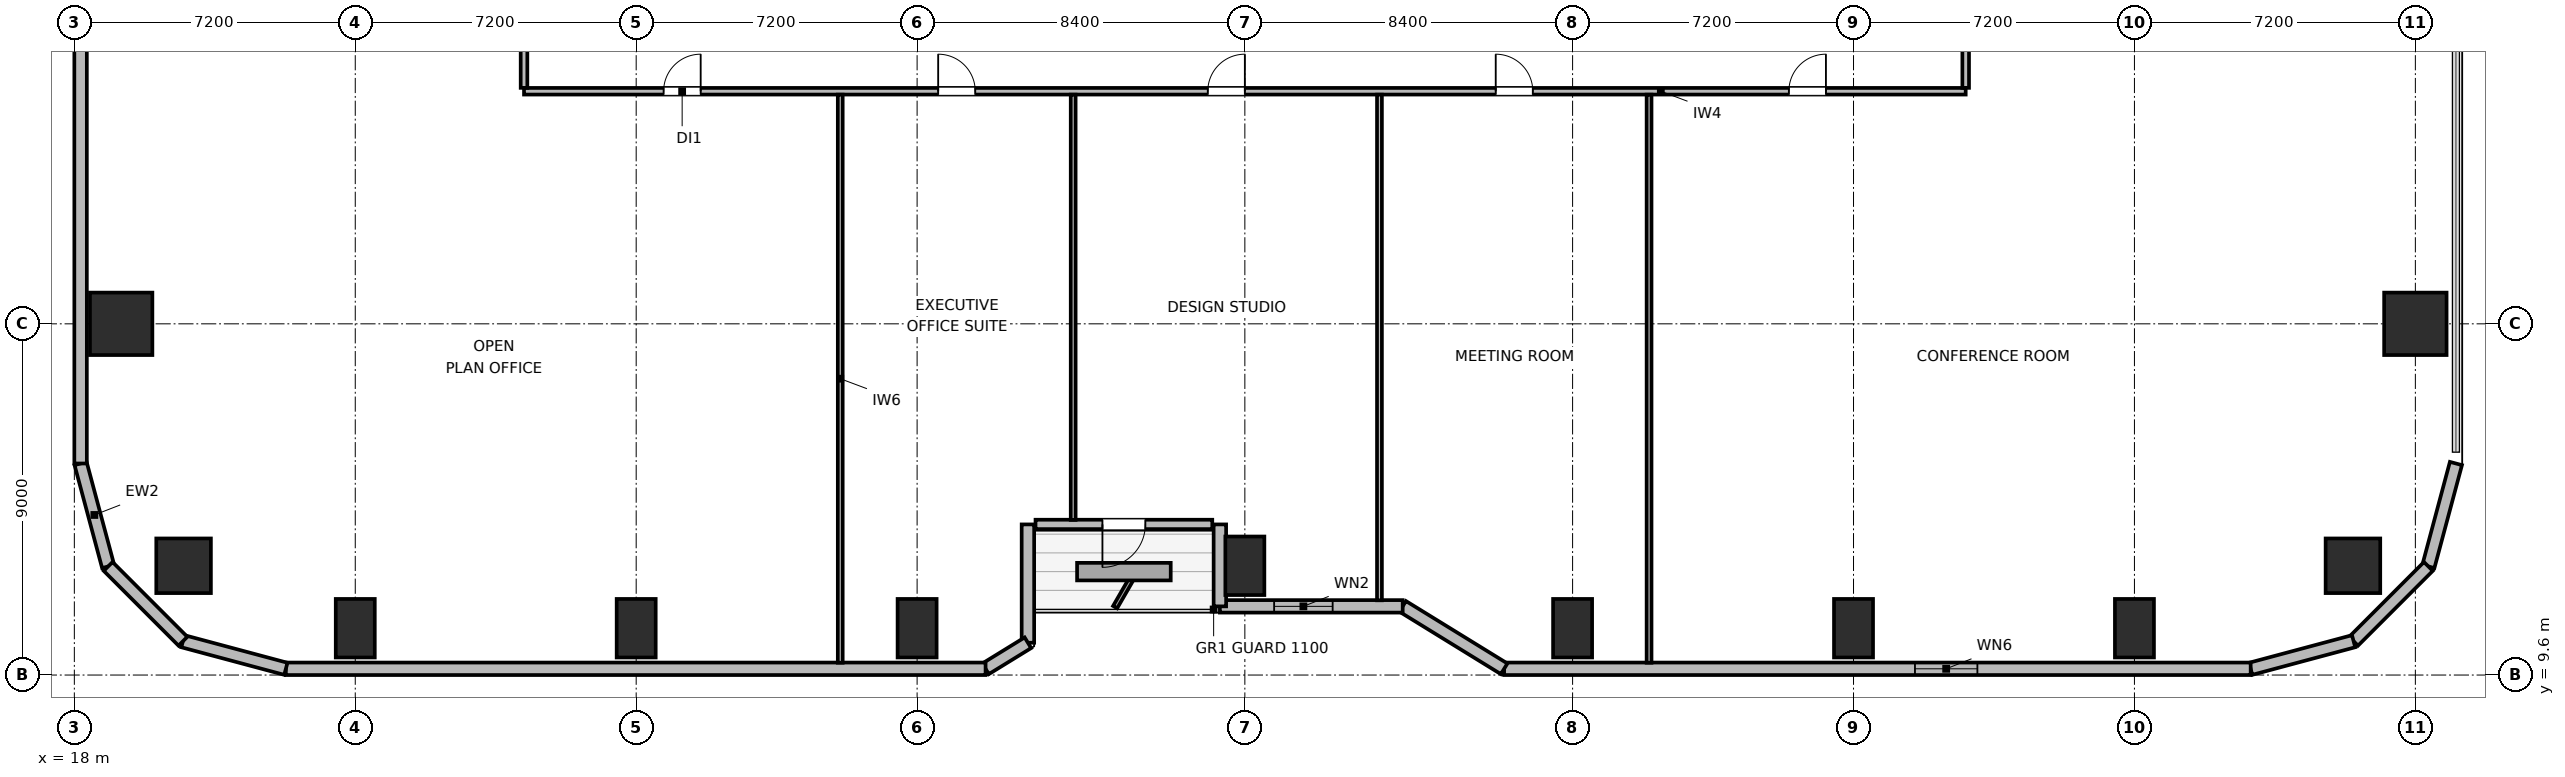
"""IFC4 building model, lengths in metres.
Left out: names, types, materials, properties, quantities, classifications, styles, units other than length and angle.
Written with IfcOpenShell. Run it as: python <this file> out.ifc"""

import sys

from ifc_helpers import new_model, si_unit, direction, frame, frame_2d, origin, origin_2d, place, context, subcontext, project, spatial, rectangle, circle, extrude, element, fill, save


model = new_model("IFC4")
c1 = context("Model", 3, precision=1e-05, world=origin(), true_north=direction((0.0, 1.0)))
c2 = subcontext(c1, "Body", "Model", "MODEL_VIEW")
j1 = project(units=[si_unit("LENGTHUNIT", "METRE"), si_unit("PLANEANGLEUNIT", "RADIAN")], contexts=[c1])
p1 = place(None, origin())
s1 = spatial("IfcSite", under=j1, at=p1, CompositionType="ELEMENT")
p2 = place(p1, origin())
s2 = spatial("IfcBuilding", under=s1, at=p2, CompositionType="ELEMENT")
p3 = place(p2, frame((0.0, 0.0, 76.8)))
s3 = spatial("IfcBuildingStorey", under=s2, at=p3, CompositionType="ELEMENT", Elevation=76.8)
for number, where, z_axis, x_axis in (
    (1, (20.8, 12.4, 0.0), (0.0, 0.0, 1.0), (1.0, 0.0, 0.0)),
    (2, (76.4, 12.4, 0.0), (0.0, 0.0, 1.0), (1.0, 0.0, 0.0)),
):
    element("IfcColumn", number, at=place(p3, frame(where, z_axis=z_axis, x_axis=x_axis)), inside=s3, PredefinedType="COLUMN", context=c2, shape_type="SweptSolid", body=[
        extrude(circle(Radius=0.7, at=origin_2d()), origin(), (0.0, 0.0, 1.0), 3.9),
    ])
for number, where, z_axis, x_axis in (
    (3, (25.2, 10.8, 0.0), (0.0, 0.0, 1.0), (1.0, 0.0, 0.0)),
    (4, (32.4, 10.8, 0.0), (0.0, 0.0, 1.0), (1.0, 0.0, 0.0)),
    (5, (39.6, 10.8, 0.0), (0.0, 0.0, 1.0), (1.0, 0.0, 0.0)),
    (6, (48.0, 12.4, 0.0), (0.0, 0.0, 1.0), (1.0, 0.0, 0.0)),
    (7, (56.4, 10.8, 0.0), (0.0, 0.0, 1.0), (1.0, 0.0, 0.0)),
    (8, (63.6, 10.8, 0.0), (0.0, 0.0, 1.0), (1.0, 0.0, 0.0)),
    (9, (70.8, 10.8, 0.0), (0.0, 0.0, 1.0), (1.0, 0.0, 0.0)),
):
    element("IfcColumn", number, at=place(p3, frame(where, z_axis=z_axis, x_axis=x_axis)), inside=s3, PredefinedType="COLUMN", context=c2, shape_type="SweptSolid", body=[
        extrude(rectangle(XDim=1.0, YDim=1.5, at=origin_2d()), origin(), (0.0, 0.0, 1.0), 3.9),
    ])
for number, where, z_axis, x_axis in (
    (10, (19.2, 18.6, 0.0), (0.0, 0.0, 1.0), (1.0, 0.0, 0.0)),
    (11, (78.0, 18.6, 0.0), (0.0, 0.0, 1.0), (1.0, 0.0, 0.0)),
):
    element("IfcColumn", number, at=place(p3, frame(where, z_axis=z_axis, x_axis=x_axis)), inside=s3, PredefinedType="COLUMN", context=c2, shape_type="SweptSolid", body=[
        extrude(rectangle(XDim=1.6, YDim=1.6, at=origin_2d()), origin(), (0.0, 0.0, 1.0), 3.9),
    ])
p4 = place(p3, frame((18.866, 12.383, 0.0), z_axis=(0.0, 0.0, 1.0), x_axis=(-0.25869736047, 0.965958423373, 0.0)))
e12 = element("IfcWall", 12, at=p4, inside=s3, PredefinedType="SOLIDWALL", context=c2, shape_type="SweptSolid", body=[
    extrude(rectangle(XDim=2.731, YDim=0.32, at=frame_2d((1.366, 0.0))), origin(), (0.0, 0.0, 1.0), 3.6),
])
p5 = place(p3, frame((18.16, 15.021, 0.0), z_axis=(0.0, 0.0, 1.0), x_axis=(0.0, 1.0, 0.0)))
e13 = element("IfcWall", 13, at=p5, inside=s3, PredefinedType="SOLIDWALL", context=c2, shape_type="SweptSolid", body=[
    extrude(rectangle(XDim=14.219, YDim=0.32, at=frame_2d((7.109, 0.0))), origin(), (0.0, 0.0, 1.0), 3.6),
])
p6 = place(p3, frame((79.04, 15.021, 0.0), z_axis=(0.0, 0.0, 1.0), x_axis=(-0.25869736047, -0.965958423373, 0.0)))
e14 = element("IfcWall", 14, at=p6, inside=s3, PredefinedType="SOLIDWALL", context=c2, shape_type="SweptSolid", body=[
    extrude(rectangle(XDim=2.731, YDim=0.32, at=frame_2d((1.366, 0.0))), origin(), (0.0, 0.0, 1.0), 3.6),
])
p7 = place(p3, frame((78.333, 12.383, 0.0), z_axis=(0.0, 0.0, 1.0), x_axis=(-0.707106781187, -0.707106781187, 0.0)))
e15 = element("IfcWall", 15, at=p7, inside=s3, PredefinedType="SOLIDWALL", context=c2, shape_type="SweptSolid", body=[
    extrude(rectangle(XDim=2.71, YDim=0.32, at=frame_2d((1.355, 0.0))), origin(), (0.0, 0.0, 1.0), 3.6),
])
p8 = place(p3, frame((76.417, 10.467, 0.0), z_axis=(0.0, 0.0, 1.0), x_axis=(-0.965964405026, -0.25867502435, 0.0)))
e16 = element("IfcWall", 16, at=p8, inside=s3, PredefinedType="SOLIDWALL", context=c2, shape_type="SweptSolid", body=[
    extrude(rectangle(XDim=2.731, YDim=0.32, at=frame_2d((1.366, 0.0))), origin(), (0.0, 0.0, 1.0), 3.6),
])
p9 = place(p3, frame((73.779, 9.76, 0.0), z_axis=(0.0, 0.0, 1.0), x_axis=(-1.0, 0.0, 0.0)))
e17 = element("IfcWall", 17, at=p9, inside=s3, PredefinedType="SOLIDWALL", context=c2, shape_type="SweptSolid", body=[
    extrude(rectangle(XDim=19.134, YDim=0.32, at=frame_2d((9.567, 0.0))), origin(), (0.0, 0.0, 1.0), 3.6),
])
p10 = place(p9, frame((7.004, 0.0, 0.85)))
e18 = element("IfcOpeningElement", 18, at=p10, cuts=e17, PredefinedType="OPENING", context=c2, shape_type="SweptSolid", body=[
    extrude(rectangle(XDim=1.6, YDim=1.0, at=frame_2d((0.8, 0.5))), frame((0.0, 0.17, 0.0), z_axis=(0.0, -1.0, 0.0), x_axis=(1.0, 0.0, 0.0)), (0.0, 0.0, 1.0), 0.34),
])
p11 = place(p3, frame((54.645, 9.76, 0.0), z_axis=(0.0, 0.0, 1.0), x_axis=(-0.851630857047, 0.524142044989, 0.0)))
e19 = element("IfcWall", 19, at=p11, inside=s3, PredefinedType="SOLIDWALL", context=c2, shape_type="SweptSolid", body=[
    extrude(rectangle(XDim=3.053, YDim=0.32, at=frame_2d((1.526, 0.0))), origin(), (0.0, 0.0, 1.0), 2.185),
])
p12 = place(p3, frame((52.045, 11.36, 0.0), z_axis=(0.0, 0.0, 1.0), x_axis=(-1.0, 0.0, 0.0)))
e20 = element("IfcWall", 20, at=p12, inside=s3, PredefinedType="SOLIDWALL", context=c2, shape_type="SweptSolid", body=[
    extrude(rectangle(XDim=4.685, YDim=0.32, at=frame_2d((2.343, 0.0))), origin(), (0.0, 0.0, 1.0), 2.185),
])
p13 = place(p12, frame((1.795, 0.0, 0.85)))
e21 = element("IfcOpeningElement", 21, at=p13, cuts=e20, PredefinedType="OPENING", context=c2, shape_type="SweptSolid", body=[
    extrude(rectangle(XDim=1.5, YDim=1.1, at=frame_2d((0.75, 0.55))), frame((0.0, 0.17, 0.0), z_axis=(0.0, -1.0, 0.0), x_axis=(1.0, 0.0, 0.0)), (0.0, 0.0, 1.0), 0.34),
])
p14 = place(p3, frame((47.36, 11.36, 0.0), z_axis=(0.0, 0.0, 1.0), x_axis=(0.0, 1.0, 0.0)))
e22 = element("IfcWall", 22, at=p14, inside=s3, PredefinedType="SOLIDWALL", context=c2, shape_type="SweptSolid", body=[
    extrude(rectangle(XDim=2.1, YDim=0.32, at=frame_2d((1.05, 0.0))), origin(), (0.0, 0.0, 1.0), 2.185),
])
p15 = place(p3, frame((47.165, 13.46, 0.0), z_axis=(0.0, 0.0, 1.0), x_axis=(-1.0, 0.0, 0.0)))
e23 = element("IfcWall", 23, at=p15, inside=s3, PredefinedType="SOLIDWALL", context=c2, shape_type="SweptSolid", body=[
    extrude(rectangle(XDim=4.53, YDim=0.24, at=frame_2d((2.265, 0.0))), origin(), (0.0, 0.0, 1.0), 2.185),
])
p16 = place(p15, frame((1.715, 0.0, 0.0)))
e24 = element("IfcOpeningElement", 24, at=p16, cuts=e23, PredefinedType="OPENING", context=c2, shape_type="SweptSolid", body=[
    extrude(rectangle(XDim=1.1, YDim=2.04, at=frame_2d((0.55, 1.02))), frame((0.0, 0.13, 0.0), z_axis=(0.0, -1.0, 0.0), x_axis=(1.0, 0.0, 0.0)), (0.0, 0.0, 1.0), 0.26),
])
p17 = place(p3, frame((42.44, 13.46, 0.0), z_axis=(0.0, 0.0, 1.0), x_axis=(0.0, -1.0, 0.0)))
e25 = element("IfcWall", 25, at=p17, inside=s3, PredefinedType="SOLIDWALL", context=c2, shape_type="SweptSolid", body=[
    extrude(rectangle(XDim=3.032, YDim=0.32, at=frame_2d((1.516, 0.0))), origin(), (0.0, 0.0, 1.0), 2.185),
])
p18 = place(p3, frame((42.44, 10.427, 0.0), z_axis=(0.0, 0.0, 1.0), x_axis=(-0.851776724646, -0.523904964045, 0.0)))
e26 = element("IfcWall", 26, at=p18, inside=s3, PredefinedType="SOLIDWALL", context=c2, shape_type="SweptSolid", body=[
    extrude(rectangle(XDim=1.274, YDim=0.32, at=frame_2d((0.637, 0.0))), origin(), (0.0, 0.0, 1.0), 3.6),
])
p19 = place(p3, frame((41.355, 9.76, 0.0), z_axis=(0.0, 0.0, 1.0), x_axis=(-1.0, 0.0, 0.0)))
e27 = element("IfcWall", 27, at=p19, inside=s3, PredefinedType="SOLIDWALL", context=c2, shape_type="SweptSolid", body=[
    extrude(rectangle(XDim=17.934, YDim=0.32, at=frame_2d((8.967, 0.0))), origin(), (0.0, 0.0, 1.0), 3.6),
])
p20 = place(p3, frame((23.421, 9.76, 0.0), z_axis=(0.0, 0.0, 1.0), x_axis=(-0.965964405026, 0.25867502435, 0.0)))
e28 = element("IfcWall", 28, at=p20, inside=s3, PredefinedType="SOLIDWALL", context=c2, shape_type="SweptSolid", body=[
    extrude(rectangle(XDim=2.731, YDim=0.32, at=frame_2d((1.366, 0.0))), origin(), (0.0, 0.0, 1.0), 3.6),
])
p21 = place(p3, frame((20.783, 10.467, 0.0), z_axis=(0.0, 0.0, 1.0), x_axis=(-0.707106781187, 0.707106781187, 0.0)))
e29 = element("IfcWall", 29, at=p21, inside=s3, PredefinedType="SOLIDWALL", context=c2, shape_type="SweptSolid", body=[
    extrude(rectangle(XDim=2.71, YDim=0.32, at=frame_2d((1.355, 0.0))), origin(), (0.0, 0.0, 1.0), 3.6),
])
p22 = place(p3, frame((29.525, 24.56, 0.0), z_axis=(0.0, 0.0, 1.0), x_axis=(1.0, 0.0, 0.0)))
e30 = element("IfcWall", 30, at=p22, inside=s3, PredefinedType="PARTITIONING", context=c2, shape_type="SweptSolid", body=[
    extrude(rectangle(XDim=36.95, YDim=0.17, at=frame_2d((18.475, 0.0))), origin(), (0.0, 0.0, 1.0), 3.6),
])
p23 = place(p22, frame((3.578, 0.0, 0.0)))
e31 = element("IfcOpeningElement", 31, at=p23, cuts=e30, PredefinedType="OPENING", context=c2, shape_type="SweptSolid", body=[
    extrude(rectangle(XDim=0.95, YDim=2.04, at=frame_2d((0.475, 1.02))), frame((0.0, 0.095, 0.0), z_axis=(0.0, -1.0, 0.0), x_axis=(1.0, 0.0, 0.0)), (0.0, 0.0, 1.0), 0.19),
])
p24 = place(p22, frame((10.615, 0.0, 0.0)))
e32 = element("IfcOpeningElement", 32, at=p24, cuts=e30, PredefinedType="OPENING", context=c2, shape_type="SweptSolid", body=[
    extrude(rectangle(XDim=0.95, YDim=2.04, at=frame_2d((0.475, 1.02))), frame((0.0, 0.095, 0.0), z_axis=(0.0, -1.0, 0.0), x_axis=(1.0, 0.0, 0.0)), (0.0, 0.0, 1.0), 0.19),
])
p25 = place(p22, frame((17.525, 0.0, 0.0)))
e33 = element("IfcOpeningElement", 33, at=p25, cuts=e30, PredefinedType="OPENING", context=c2, shape_type="SweptSolid", body=[
    extrude(rectangle(XDim=0.95, YDim=2.04, at=frame_2d((0.475, 1.02))), frame((0.0, 0.095, 0.0), z_axis=(0.0, -1.0, 0.0), x_axis=(1.0, 0.0, 0.0)), (0.0, 0.0, 1.0), 0.19),
])
p26 = place(p22, frame((24.905, 0.0, 0.0)))
e34 = element("IfcOpeningElement", 34, at=p26, cuts=e30, PredefinedType="OPENING", context=c2, shape_type="SweptSolid", body=[
    extrude(rectangle(XDim=0.95, YDim=2.04, at=frame_2d((0.475, 1.02))), frame((0.0, 0.095, 0.0), z_axis=(0.0, -1.0, 0.0), x_axis=(1.0, 0.0, 0.0)), (0.0, 0.0, 1.0), 0.19),
])
p27 = place(p22, frame((32.418, 0.0, 0.0)))
e35 = element("IfcOpeningElement", 35, at=p27, cuts=e30, PredefinedType="OPENING", context=c2, shape_type="SweptSolid", body=[
    extrude(rectangle(XDim=0.95, YDim=2.04, at=frame_2d((0.475, 1.02))), frame((0.0, 0.095, 0.0), z_axis=(0.0, -1.0, 0.0), x_axis=(1.0, 0.0, 0.0)), (0.0, 0.0, 1.0), 0.19),
])
p28 = place(p3, frame((29.525, 24.647, 0.0), z_axis=(0.0, 0.0, 1.0), x_axis=(0.0, 1.0, 0.0)))
e36 = element("IfcWall", 36, at=p28, inside=s3, PredefinedType="PARTITIONING", context=c2, shape_type="SweptSolid", body=[
    extrude(rectangle(XDim=22.706, YDim=0.17, at=frame_2d((11.353, 0.0))), origin(), (0.0, 0.0, 1.0), 3.6),
])
p29 = place(p28, frame((4.758, 0.0, 0.0)))
e37 = element("IfcOpeningElement", 37, at=p29, cuts=e36, PredefinedType="OPENING", context=c2, shape_type="SweptSolid", body=[
    extrude(rectangle(XDim=0.95, YDim=2.04, at=frame_2d((0.475, 1.02))), frame((0.0, 0.095, 0.0), z_axis=(0.0, -1.0, 0.0), x_axis=(1.0, 0.0, 0.0)), (0.0, 0.0, 1.0), 0.19),
])
p30 = place(p28, frame((16.198, 0.0, 0.0)))
e38 = element("IfcOpeningElement", 38, at=p30, cuts=e36, PredefinedType="OPENING", context=c2, shape_type="SweptSolid", body=[
    extrude(rectangle(XDim=0.95, YDim=2.04, at=frame_2d((0.475, 1.02))), frame((0.0, 0.095, 0.0), z_axis=(0.0, -1.0, 0.0), x_axis=(1.0, 0.0, 0.0)), (0.0, 0.0, 1.0), 0.19),
])
p31 = place(p3, frame((66.475, 24.647, 0.0), z_axis=(0.0, 0.0, 1.0), x_axis=(0.0, 1.0, 0.0)))
e39 = element("IfcWall", 39, at=p31, inside=s3, PredefinedType="PARTITIONING", context=c2, shape_type="SweptSolid", body=[
    extrude(rectangle(XDim=22.706, YDim=0.17, at=frame_2d((11.353, 0.0))), origin(), (0.0, 0.0, 1.0), 3.6),
])
p32 = place(p31, frame((4.658, 0.0, 0.0)))
e40 = element("IfcOpeningElement", 40, at=p32, cuts=e39, PredefinedType="OPENING", context=c2, shape_type="SweptSolid", body=[
    extrude(rectangle(XDim=0.95, YDim=2.04, at=frame_2d((0.475, 1.02))), frame((0.0, 0.095, 0.0), z_axis=(0.0, -1.0, 0.0), x_axis=(1.0, 0.0, 0.0)), (0.0, 0.0, 1.0), 0.19),
])
p33 = place(p31, frame((16.098, 0.0, 0.0)))
e41 = element("IfcOpeningElement", 41, at=p33, cuts=e39, PredefinedType="OPENING", context=c2, shape_type="SweptSolid", body=[
    extrude(rectangle(XDim=0.95, YDim=2.04, at=frame_2d((0.475, 1.02))), frame((0.0, 0.095, 0.0), z_axis=(0.0, -1.0, 0.0), x_axis=(1.0, 0.0, 0.0)), (0.0, 0.0, 1.0), 0.19),
])
p34 = place(p3, frame((37.63, 9.915, 0.0), z_axis=(0.0, 0.0, 1.0), x_axis=(0.0, 1.0, 0.0)))
e42 = element("IfcWall", 42, at=p34, inside=s3, PredefinedType="PARTITIONING", context=c2, shape_type="SweptSolid", body=[
    extrude(rectangle(XDim=14.558, YDim=0.125, at=frame_2d((7.279, 0.0))), origin(), (0.0, 0.0, 1.0), 3.6),
])
p35 = place(p3, frame((43.6, 13.575, 0.0), z_axis=(0.0, 0.0, 1.0), x_axis=(0.0, 1.0, 0.0)))
e43 = element("IfcWall", 43, at=p35, inside=s3, PredefinedType="PARTITIONING", context=c2, shape_type="SweptSolid", body=[
    extrude(rectangle(XDim=10.898, YDim=0.125, at=frame_2d((5.449, 0.0))), origin(), (0.0, 0.0, 1.0), 2.963),
])
p36 = place(p3, frame((51.45, 11.515, 0.0), z_axis=(0.0, 0.0, 1.0), x_axis=(0.0, 1.0, 0.0)))
e44 = element("IfcWall", 44, at=p36, inside=s3, PredefinedType="PARTITIONING", context=c2, shape_type="SweptSolid", body=[
    extrude(rectangle(XDim=12.958, YDim=0.125, at=frame_2d((6.479, 0.0))), origin(), (0.0, 0.0, 1.0), 2.963),
])
p37 = place(p3, frame((58.36, 9.915, 0.0), z_axis=(0.0, 0.0, 1.0), x_axis=(0.0, 1.0, 0.0)))
e45 = element("IfcWall", 45, at=p37, inside=s3, PredefinedType="PARTITIONING", context=c2, shape_type="SweptSolid", body=[
    extrude(rectangle(XDim=14.558, YDim=0.125, at=frame_2d((7.279, 0.0))), origin(), (0.0, 0.0, 1.0), 3.6),
])
p38 = place(p10, origin())
e46 = element("IfcWindow", 46, at=p38, inside=s3, PartitioningType="SINGLE_PANEL", PredefinedType="WINDOW", context=c2, shape_type="SweptSolid", body=[
    extrude(rectangle(XDim=1.6, YDim=1.0, at=frame_2d((0.8, 0.5))), frame((0.0, 0.03, 0.0), z_axis=(0.0, -1.0, 0.0), x_axis=(1.0, 0.0, 0.0)), (0.0, 0.0, 1.0), 0.06),
])
fill(e18, e46)
p39 = place(p13, origin())
e47 = element("IfcWindow", 47, at=p39, inside=s3, PartitioningType="SINGLE_PANEL", PredefinedType="WINDOW", context=c2, shape_type="SweptSolid", body=[
    extrude(rectangle(XDim=1.5, YDim=1.1, at=frame_2d((0.75, 0.55))), frame((0.0, 0.03, 0.0), z_axis=(0.0, -1.0, 0.0), x_axis=(1.0, 0.0, 0.0)), (0.0, 0.0, 1.0), 0.06),
])
fill(e21, e47)
p40 = place(p16, origin())
e48 = element("IfcDoor", 48, at=p40, inside=s3, OperationType="SINGLE_SWING_RIGHT", PredefinedType="DOOR", context=c2, shape_type="SweptSolid", body=[
    extrude(rectangle(XDim=1.1, YDim=2.04, at=frame_2d((0.55, 1.02))), frame((0.0, 0.025, 0.0), z_axis=(0.0, -1.0, 0.0), x_axis=(1.0, 0.0, 0.0)), (0.0, 0.0, 1.0), 0.05),
])
fill(e24, e48)
p41 = place(p23, origin())
e49 = element("IfcDoor", 49, at=p41, inside=s3, OperationType="SINGLE_SWING_RIGHT", PredefinedType="DOOR", context=c2, shape_type="SweptSolid", body=[
    extrude(rectangle(XDim=0.95, YDim=2.04, at=frame_2d((0.475, 1.02))), frame((0.0, 0.025, 0.0), z_axis=(0.0, -1.0, 0.0), x_axis=(1.0, 0.0, 0.0)), (0.0, 0.0, 1.0), 0.05),
])
fill(e31, e49)
p42 = place(p24, origin())
e50 = element("IfcDoor", 50, at=p42, inside=s3, OperationType="SINGLE_SWING_LEFT", PredefinedType="DOOR", context=c2, shape_type="SweptSolid", body=[
    extrude(rectangle(XDim=0.95, YDim=2.04, at=frame_2d((0.475, 1.02))), frame((0.0, 0.025, 0.0), z_axis=(0.0, -1.0, 0.0), x_axis=(1.0, 0.0, 0.0)), (0.0, 0.0, 1.0), 0.05),
])
fill(e32, e50)
p43 = place(p25, origin())
e51 = element("IfcDoor", 51, at=p43, inside=s3, OperationType="SINGLE_SWING_RIGHT", PredefinedType="DOOR", context=c2, shape_type="SweptSolid", body=[
    extrude(rectangle(XDim=0.95, YDim=2.04, at=frame_2d((0.475, 1.02))), frame((0.0, 0.025, 0.0), z_axis=(0.0, -1.0, 0.0), x_axis=(1.0, 0.0, 0.0)), (0.0, 0.0, 1.0), 0.05),
])
fill(e33, e51)
p44 = place(p26, origin())
e52 = element("IfcDoor", 52, at=p44, inside=s3, OperationType="SINGLE_SWING_LEFT", PredefinedType="DOOR", context=c2, shape_type="SweptSolid", body=[
    extrude(rectangle(XDim=0.95, YDim=2.04, at=frame_2d((0.475, 1.02))), frame((0.0, 0.025, 0.0), z_axis=(0.0, -1.0, 0.0), x_axis=(1.0, 0.0, 0.0)), (0.0, 0.0, 1.0), 0.05),
])
fill(e34, e52)
p45 = place(p27, origin())
e53 = element("IfcDoor", 53, at=p45, inside=s3, OperationType="SINGLE_SWING_RIGHT", PredefinedType="DOOR", context=c2, shape_type="SweptSolid", body=[
    extrude(rectangle(XDim=0.95, YDim=2.04, at=frame_2d((0.475, 1.02))), frame((0.0, 0.025, 0.0), z_axis=(0.0, -1.0, 0.0), x_axis=(1.0, 0.0, 0.0)), (0.0, 0.0, 1.0), 0.05),
])
fill(e35, e53)
save(model, sys.argv[1])
